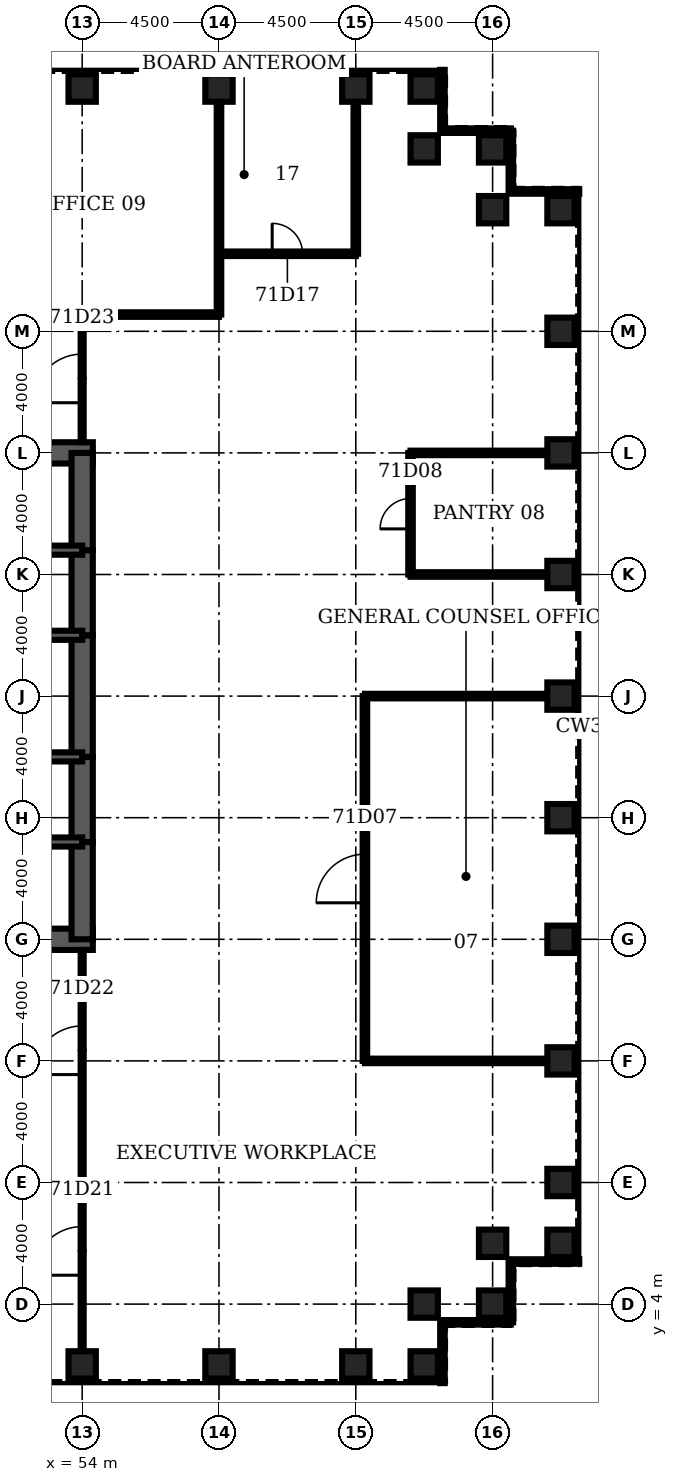
"""IFC4 building model, lengths in metres.
Left out: names, types, materials, properties, quantities, classifications, styles, units other than length and angle.
Written with IfcOpenShell. Run it as: python <this file> out.ifc"""

import sys

from ifc_helpers import new_model, si_unit, direction, frame, frame_2d, origin, origin_2d, place, context, subcontext, project, spatial, rectangle, hollow_rectangle, extrude, element, fill, save


model = new_model("IFC4")
c1 = context("Model", 3, precision=1e-05, world=origin(), true_north=direction((0.0, 1.0)))
c2 = subcontext(c1, "Body", "Model", "MODEL_VIEW")
j1 = project(units=[si_unit("LENGTHUNIT", "METRE"), si_unit("PLANEANGLEUNIT", "RADIAN")], contexts=[c1])
p1 = place(None, origin())
s1 = spatial("IfcSite", under=j1, at=p1, CompositionType="ELEMENT")
p2 = place(p1, origin())
s2 = spatial("IfcBuilding", under=s1, at=p2, CompositionType="ELEMENT")
p3 = place(p2, frame((0.0, 0.0, 313.1)))
s3 = spatial("IfcBuildingStorey", under=s2, at=p3, CompositionType="ELEMENT", Elevation=313.1)
for number, where, z_axis, x_axis in (
    (1, (54.0, 2.0, 0.0), (0.0, 0.0, 1.0), (0.0, 1.0, 0.0)),
    (2, (58.5, 2.0, 0.0), (0.0, 0.0, 1.0), (0.0, 1.0, 0.0)),
    (3, (63.0, 2.0, 0.0), (0.0, 0.0, 1.0), (0.0, 1.0, 0.0)),
    (4, (65.25, 2.0, 0.0), (0.0, 0.0, 1.0), (0.0, 1.0, 0.0)),
    (5, (65.25, 4.0, 0.0), (0.0, 0.0, 1.0), (0.0, 1.0, 0.0)),
    (6, (67.5, 4.0, 0.0), (0.0, 0.0, 1.0), (1.0, 0.0, 0.0)),
    (7, (67.5, 6.0, 0.0), (0.0, 0.0, 1.0), (1.0, 0.0, 0.0)),
    (8, (69.75, 6.0, 0.0), (0.0, 0.0, 1.0), (1.0, 0.0, 0.0)),
    (9, (69.75, 8.0, 0.0), (0.0, 0.0, 1.0), (1.0, 0.0, 0.0)),
    (10, (69.75, 12.0, 0.0), (0.0, 0.0, 1.0), (1.0, 0.0, 0.0)),
    (11, (69.75, 16.0, 0.0), (0.0, 0.0, 1.0), (1.0, 0.0, 0.0)),
    (12, (69.75, 20.0, 0.0), (0.0, 0.0, 1.0), (1.0, 0.0, 0.0)),
    (13, (69.75, 24.0, 0.0), (0.0, 0.0, 1.0), (1.0, 0.0, 0.0)),
    (14, (69.75, 28.0, 0.0), (0.0, 0.0, 1.0), (1.0, 0.0, 0.0)),
    (15, (69.75, 32.0, 0.0), (0.0, 0.0, 1.0), (1.0, 0.0, 0.0)),
    (16, (69.75, 36.0, 0.0), (0.0, 0.0, 1.0), (1.0, 0.0, 0.0)),
    (17, (69.75, 40.0, 0.0), (0.0, 0.0, 1.0), (1.0, 0.0, 0.0)),
    (18, (67.5, 40.0, 0.0), (0.0, 0.0, 1.0), (1.0, 0.0, 0.0)),
    (19, (67.5, 42.0, 0.0), (0.0, 0.0, 1.0), (1.0, 0.0, 0.0)),
    (20, (65.25, 42.0, 0.0), (0.0, 0.0, 1.0), (0.0, 1.0, 0.0)),
    (21, (65.25, 44.0, 0.0), (0.0, 0.0, 1.0), (0.0, 1.0, 0.0)),
    (22, (63.0, 44.0, 0.0), (0.0, 0.0, 1.0), (0.0, 1.0, 0.0)),
    (23, (58.5, 44.0, 0.0), (0.0, 0.0, 1.0), (0.0, 1.0, 0.0)),
    (24, (54.0, 44.0, 0.0), (0.0, 0.0, 1.0), (0.0, 1.0, 0.0)),
):
    element("IfcColumn", number, at=place(p3, frame(where, z_axis=z_axis, x_axis=x_axis)), inside=s3, PredefinedType="COLUMN", context=c2, shape_type="SweptSolid", body=[
        extrude(hollow_rectangle(XDim=0.9, YDim=0.9, WallThickness=0.05, at=origin_2d()), origin(), (0.0, 0.0, 1.0), 4.2),
    ])
for number, where, z_axis, x_axis in (
    (25, (45.0, 16.0, 0.0), (0.0, 0.0, 1.0), (1.0, 0.0, 0.0)),
    (26, (54.35, 32.0, 0.0), (0.0, 0.0, 1.0), (-1.0, 0.0, 0.0)),
):
    element("IfcWall", number, at=place(p3, frame(where, z_axis=z_axis, x_axis=x_axis)), inside=s3, PredefinedType="SHEAR", context=c2, shape_type="SweptSolid", body=[
        extrude(rectangle(XDim=9.35, YDim=0.7, at=frame_2d((4.675, 0.0))), origin(), (0.0, 0.0, 1.0), 4.2),
    ])
p4 = place(p3, frame((54.0, 16.0, 0.0), z_axis=(0.0, 0.0, 1.0), x_axis=(0.0, 1.0, 0.0)))
e27 = element("IfcWall", 27, at=p4, inside=s3, PredefinedType="SHEAR", context=c2, shape_type="SweptSolid", body=[
    extrude(rectangle(XDim=3.2, YDim=0.7, at=frame_2d((1.6, 0.0))), origin(), (0.0, 0.0, 1.0), 4.2),
])
p5 = place(p3, frame((54.0, 19.2, 0.0), z_axis=(0.0, 0.0, 1.0), x_axis=(0.0, 1.0, 0.0)))
e28 = element("IfcWall", 28, at=p5, inside=s3, PredefinedType="SHEAR", context=c2, shape_type="SweptSolid", body=[
    extrude(rectangle(XDim=2.8, YDim=0.7, at=frame_2d((1.4, 0.0))), origin(), (0.0, 0.0, 1.0), 4.2),
])
p6 = place(p5, frame((0.4, 0.0, 0.0)))
e29 = element("IfcOpeningElement", 29, at=p6, cuts=e28, PredefinedType="OPENING", context=c2, shape_type="SweptSolid", body=[
    extrude(rectangle(XDim=1.8, YDim=2.1, at=frame_2d((0.9, 1.05))), frame((0.0, 0.36, 0.0), z_axis=(0.0, -1.0, 0.0), x_axis=(1.0, 0.0, 0.0)), (0.0, 0.0, 1.0), 0.72),
])
p7 = place(p3, frame((54.0, 22.0, 0.0), z_axis=(0.0, 0.0, 1.0), x_axis=(0.0, 1.0, 0.0)))
e30 = element("IfcWall", 30, at=p7, inside=s3, PredefinedType="SHEAR", context=c2, shape_type="SweptSolid", body=[
    extrude(rectangle(XDim=4.0, YDim=0.7, at=frame_2d((2.0, 0.0))), origin(), (0.0, 0.0, 1.0), 4.2),
])
p8 = place(p3, frame((54.0, 26.0, 0.0), z_axis=(0.0, 0.0, 1.0), x_axis=(0.0, 1.0, 0.0)))
e31 = element("IfcWall", 31, at=p8, inside=s3, PredefinedType="SHEAR", context=c2, shape_type="SweptSolid", body=[
    extrude(rectangle(XDim=2.8, YDim=0.7, at=frame_2d((1.4, 0.0))), origin(), (0.0, 0.0, 1.0), 4.2),
])
p9 = place(p8, frame((0.6, 0.0, 0.0)))
e32 = element("IfcOpeningElement", 32, at=p9, cuts=e31, PredefinedType="OPENING", context=c2, shape_type="SweptSolid", body=[
    extrude(rectangle(XDim=1.8, YDim=2.1, at=frame_2d((0.9, 1.05))), frame((0.0, 0.36, 0.0), z_axis=(0.0, -1.0, 0.0), x_axis=(1.0, 0.0, 0.0)), (0.0, 0.0, 1.0), 0.72),
])
p10 = place(p3, frame((54.0, 28.8, 0.0), z_axis=(0.0, 0.0, 1.0), x_axis=(0.0, 1.0, 0.0)))
e33 = element("IfcWall", 33, at=p10, inside=s3, PredefinedType="SHEAR", context=c2, shape_type="SweptSolid", body=[
    extrude(rectangle(XDim=3.2, YDim=0.7, at=frame_2d((1.6, 0.0))), origin(), (0.0, 0.0, 1.0), 4.2),
])
p11 = place(p3, frame((45.0, 19.2, 0.0), z_axis=(0.0, 0.0, 1.0), x_axis=(1.0, 0.0, 0.0)))
e34 = element("IfcWall", 34, at=p11, inside=s3, PredefinedType="SOLIDWALL", context=c2, shape_type="SweptSolid", body=[
    extrude(rectangle(XDim=9.0, YDim=0.3, at=frame_2d((4.5, 0.0))), origin(), (0.0, 0.0, 1.0), 4.2),
])
p12 = place(p11, frame((7.35, 0.0, 0.0)))
e35 = element("IfcOpeningElement", 35, at=p12, cuts=e34, PredefinedType="OPENING", context=c2, shape_type="SweptSolid", body=[
    extrude(rectangle(XDim=1.0, YDim=2.1, at=frame_2d((0.5, 1.05))), frame((0.0, 0.16, 0.0), z_axis=(0.0, -1.0, 0.0), x_axis=(1.0, 0.0, 0.0)), (0.0, 0.0, 1.0), 0.32),
])
p13 = place(p3, frame((45.0, 28.8, 0.0), z_axis=(0.0, 0.0, 1.0), x_axis=(1.0, 0.0, 0.0)))
e36 = element("IfcWall", 36, at=p13, inside=s3, PredefinedType="SOLIDWALL", context=c2, shape_type="SweptSolid", body=[
    extrude(rectangle(XDim=9.0, YDim=0.3, at=frame_2d((4.5, 0.0))), origin(), (0.0, 0.0, 1.0), 4.2),
])
p14 = place(p13, frame((7.35, 0.0, 0.0)))
e37 = element("IfcOpeningElement", 37, at=p14, cuts=e36, PredefinedType="OPENING", context=c2, shape_type="SweptSolid", body=[
    extrude(rectangle(XDim=1.0, YDim=2.1, at=frame_2d((0.5, 1.05))), frame((0.0, 0.16, 0.0), z_axis=(0.0, -1.0, 0.0), x_axis=(1.0, 0.0, 0.0)), (0.0, 0.0, 1.0), 0.32),
])
p15 = place(p3, frame((48.0, 22.0, 0.0), z_axis=(0.0, 0.0, 1.0), x_axis=(1.0, 0.0, 0.0)))
e38 = element("IfcWall", 38, at=p15, inside=s3, PredefinedType="SOLIDWALL", context=c2, shape_type="SweptSolid", body=[
    extrude(rectangle(XDim=6.0, YDim=0.3, at=frame_2d((3.0, 0.0))), origin(), (0.0, 0.0, 1.0), 4.2),
])
p16 = place(p15, frame((2.0, 0.0, 0.0)))
e39 = element("IfcOpeningElement", 39, at=p16, cuts=e38, PredefinedType="OPENING", context=c2, shape_type="SweptSolid", body=[
    extrude(rectangle(XDim=1.0, YDim=2.1, at=frame_2d((0.5, 1.05))), frame((0.0, 0.16, 0.0), z_axis=(0.0, -1.0, 0.0), x_axis=(1.0, 0.0, 0.0)), (0.0, 0.0, 1.0), 0.32),
])
p17 = place(p15, frame((4.25, 0.0, 0.0)))
e40 = element("IfcOpeningElement", 40, at=p17, cuts=e38, PredefinedType="OPENING", context=c2, shape_type="SweptSolid", body=[
    extrude(rectangle(XDim=1.0, YDim=2.1, at=frame_2d((0.5, 1.05))), frame((0.0, 0.16, 0.0), z_axis=(0.0, -1.0, 0.0), x_axis=(1.0, 0.0, 0.0)), (0.0, 0.0, 1.0), 0.32),
])
p18 = place(p3, frame((48.0, 26.0, 0.0), z_axis=(0.0, 0.0, 1.0), x_axis=(1.0, 0.0, 0.0)))
e41 = element("IfcWall", 41, at=p18, inside=s3, PredefinedType="SOLIDWALL", context=c2, shape_type="SweptSolid", body=[
    extrude(rectangle(XDim=6.0, YDim=0.3, at=frame_2d((3.0, 0.0))), origin(), (0.0, 0.0, 1.0), 4.2),
])
for number, where, z_axis, x_axis in (
    (42, (63.3, 12.0, 0.0), (0.0, 0.0, 1.0), (1.0, 0.0, 0.0)),
    (43, (63.3, 24.0, 0.0), (0.0, 0.0, 1.0), (1.0, 0.0, 0.0)),
):
    element("IfcWall", number, at=place(p3, frame(where, z_axis=z_axis, x_axis=x_axis)), inside=s3, PredefinedType="PARTITIONING", context=c2, shape_type="SweptSolid", body=[
        extrude(rectangle(XDim=6.0, YDim=0.15, at=frame_2d((3.0, 0.0))), origin(), (0.0, 0.0, 1.0), 3.0),
    ])
for number, where, z_axis, x_axis in (
    (44, (64.8, 28.0, 0.0), (0.0, 0.0, 1.0), (1.0, 0.0, 0.0)),
    (45, (64.8, 32.0, 0.0), (0.0, 0.0, 1.0), (1.0, 0.0, 0.0)),
):
    element("IfcWall", number, at=place(p3, frame(where, z_axis=z_axis, x_axis=x_axis)), inside=s3, PredefinedType="PARTITIONING", context=c2, shape_type="SweptSolid", body=[
        extrude(rectangle(XDim=4.5, YDim=0.15, at=frame_2d((2.25, 0.0))), origin(), (0.0, 0.0, 1.0), 3.0),
    ])
p19 = place(p3, frame((45.0, 36.55, 0.0), z_axis=(0.0, 0.0, 1.0), x_axis=(1.0, 0.0, 0.0)))
e46 = element("IfcWall", 46, at=p19, inside=s3, PredefinedType="PARTITIONING", context=c2, shape_type="SweptSolid", body=[
    extrude(rectangle(XDim=13.5, YDim=0.15, at=frame_2d((6.75, 0.0))), origin(), (0.0, 0.0, 1.0), 3.0),
])
p20 = place(p19, frame((5.95, 0.0, 0.0)))
e47 = element("IfcOpeningElement", 47, at=p20, cuts=e46, PredefinedType="OPENING", context=c2, shape_type="SweptSolid", body=[
    extrude(rectangle(XDim=1.6, YDim=2.1, at=frame_2d((0.8, 1.05))), frame((0.0, 0.085, 0.0), z_axis=(0.0, -1.0, 0.0), x_axis=(1.0, 0.0, 0.0)), (0.0, 0.0, 1.0), 0.17),
])
p21 = place(p3, frame((58.5, 38.55, 0.0), z_axis=(0.0, 0.0, 1.0), x_axis=(1.0, 0.0, 0.0)))
e48 = element("IfcWall", 48, at=p21, inside=s3, PredefinedType="PARTITIONING", context=c2, shape_type="SweptSolid", body=[
    extrude(rectangle(XDim=4.5, YDim=0.15, at=frame_2d((2.25, 0.0))), origin(), (0.0, 0.0, 1.0), 3.0),
])
p22 = place(p21, frame((1.75, 0.0, 0.0)))
e49 = element("IfcOpeningElement", 49, at=p22, cuts=e48, PredefinedType="OPENING", context=c2, shape_type="SweptSolid", body=[
    extrude(rectangle(XDim=1.0, YDim=2.1, at=frame_2d((0.5, 1.05))), frame((0.0, 0.085, 0.0), z_axis=(0.0, -1.0, 0.0), x_axis=(1.0, 0.0, 0.0)), (0.0, 0.0, 1.0), 0.17),
])
p23 = place(p3, frame((54.0, 2.45, 0.0), z_axis=(0.0, 0.0, 1.0), x_axis=(0.0, 1.0, 0.0)))
e50 = element("IfcWall", 50, at=p23, inside=s3, PredefinedType="PARTITIONING", context=c2, shape_type="SweptSolid", body=[
    extrude(rectangle(XDim=13.2, YDim=0.1, at=frame_2d((6.6, 0.0))), origin(), (0.0, 0.0, 1.0), 3.0),
])
p24 = place(p23, frame((2.5, 0.0, 0.0)))
e51 = element("IfcOpeningElement", 51, at=p24, cuts=e50, PredefinedType="OPENING", context=c2, shape_type="SweptSolid", body=[
    extrude(rectangle(XDim=1.6, YDim=2.1, at=frame_2d((0.8, 1.05))), frame((0.0, 0.06, 0.0), z_axis=(0.0, -1.0, 0.0), x_axis=(1.0, 0.0, 0.0)), (0.0, 0.0, 1.0), 0.12),
])
p25 = place(p23, frame((9.1, 0.0, 0.0)))
e52 = element("IfcOpeningElement", 52, at=p25, cuts=e50, PredefinedType="OPENING", context=c2, shape_type="SweptSolid", body=[
    extrude(rectangle(XDim=1.6, YDim=2.1, at=frame_2d((0.8, 1.05))), frame((0.0, 0.06, 0.0), z_axis=(0.0, -1.0, 0.0), x_axis=(1.0, 0.0, 0.0)), (0.0, 0.0, 1.0), 0.12),
])
p26 = place(p3, frame((54.0, 32.35, 0.0), z_axis=(0.0, 0.0, 1.0), x_axis=(0.0, 1.0, 0.0)))
e53 = element("IfcWall", 53, at=p26, inside=s3, PredefinedType="PARTITIONING", context=c2, shape_type="SweptSolid", body=[
    extrude(rectangle(XDim=4.2, YDim=0.1, at=frame_2d((2.1, 0.0))), origin(), (0.0, 0.0, 1.0), 3.0),
])
p27 = place(p26, frame((1.3, 0.0, 0.0)))
e54 = element("IfcOpeningElement", 54, at=p27, cuts=e53, PredefinedType="OPENING", context=c2, shape_type="SweptSolid", body=[
    extrude(rectangle(XDim=1.6, YDim=2.1, at=frame_2d((0.8, 1.05))), frame((0.0, 0.06, 0.0), z_axis=(0.0, -1.0, 0.0), x_axis=(1.0, 0.0, 0.0)), (0.0, 0.0, 1.0), 0.12),
])
p28 = place(p3, frame((58.5, 36.55, 0.0), z_axis=(0.0, 0.0, 1.0), x_axis=(0.0, 1.0, 0.0)))
e55 = element("IfcWall", 55, at=p28, inside=s3, PredefinedType="PARTITIONING", context=c2, shape_type="SweptSolid", body=[
    extrude(rectangle(XDim=7.0, YDim=0.15, at=frame_2d((3.5, 0.0))), origin(), (0.0, 0.0, 1.0), 3.0),
])
p29 = place(p3, frame((63.0, 38.55, 0.0), z_axis=(0.0, 0.0, 1.0), x_axis=(0.0, 1.0, 0.0)))
e56 = element("IfcWall", 56, at=p29, inside=s3, PredefinedType="PARTITIONING", context=c2, shape_type="SweptSolid", body=[
    extrude(rectangle(XDim=5.0, YDim=0.15, at=frame_2d((2.5, 0.0))), origin(), (0.0, 0.0, 1.0), 3.0),
])
p30 = place(p3, frame((63.3, 12.0, 0.0), z_axis=(0.0, 0.0, 1.0), x_axis=(0.0, 1.0, 0.0)))
e57 = element("IfcWall", 57, at=p30, inside=s3, PredefinedType="PARTITIONING", context=c2, shape_type="SweptSolid", body=[
    extrude(rectangle(XDim=12.0, YDim=0.15, at=frame_2d((6.0, 0.0))), origin(), (0.0, 0.0, 1.0), 3.0),
])
p31 = place(p30, frame((5.2, 0.0, 0.0)))
e58 = element("IfcOpeningElement", 58, at=p31, cuts=e57, PredefinedType="OPENING", context=c2, shape_type="SweptSolid", body=[
    extrude(rectangle(XDim=1.6, YDim=2.1, at=frame_2d((0.8, 1.05))), frame((0.0, 0.085, 0.0), z_axis=(0.0, -1.0, 0.0), x_axis=(1.0, 0.0, 0.0)), (0.0, 0.0, 1.0), 0.17),
])
p32 = place(p3, frame((64.8, 28.0, 0.0), z_axis=(0.0, 0.0, 1.0), x_axis=(0.0, 1.0, 0.0)))
e59 = element("IfcWall", 59, at=p32, inside=s3, PredefinedType="PARTITIONING", context=c2, shape_type="SweptSolid", body=[
    extrude(rectangle(XDim=4.0, YDim=0.15, at=frame_2d((2.0, 0.0))), origin(), (0.0, 0.0, 1.0), 3.0),
])
p33 = place(p32, frame((1.5, 0.0, 0.0)))
e60 = element("IfcOpeningElement", 60, at=p33, cuts=e59, PredefinedType="OPENING", context=c2, shape_type="SweptSolid", body=[
    extrude(rectangle(XDim=1.0, YDim=2.1, at=frame_2d((0.5, 1.05))), frame((0.0, 0.085, 0.0), z_axis=(0.0, -1.0, 0.0), x_axis=(1.0, 0.0, 0.0)), (0.0, 0.0, 1.0), 0.17),
])
p34 = place(p3, frame((65.85, 1.4, 0.0), z_axis=(0.0, 0.0, 1.0), x_axis=(0.0, 1.0, 0.0)))
e61 = element("IfcWall", 61, at=p34, inside=s3, PredefinedType="ELEMENTEDWALL", context=c2, shape_type="SweptSolid", body=[
    extrude(rectangle(XDim=2.0, YDim=0.15, at=frame_2d((1.0, 0.0))), origin(), (0.0, 0.0, 1.0), 4.04),
])
p35 = place(p3, frame((65.85, 3.4, 0.0), z_axis=(0.0, 0.0, 1.0), x_axis=(1.0, 0.0, 0.0)))
e62 = element("IfcWall", 62, at=p35, inside=s3, PredefinedType="ELEMENTEDWALL", context=c2, shape_type="SweptSolid", body=[
    extrude(rectangle(XDim=2.25, YDim=0.15, at=frame_2d((1.125, 0.0))), origin(), (0.0, 0.0, 1.0), 4.04),
])
p36 = place(p3, frame((68.1, 3.4, 0.0), z_axis=(0.0, 0.0, 1.0), x_axis=(0.0, 1.0, 0.0)))
e63 = element("IfcWall", 63, at=p36, inside=s3, PredefinedType="ELEMENTEDWALL", context=c2, shape_type="SweptSolid", body=[
    extrude(rectangle(XDim=2.0, YDim=0.15, at=frame_2d((1.0, 0.0))), origin(), (0.0, 0.0, 1.0), 4.04),
])
for number, where, z_axis, x_axis in (
    (64, (68.1, 5.4, 0.0), (0.0, 0.0, 1.0), (1.0, 0.0, 0.0)),
    (65, (70.35, 40.6, 0.0), (0.0, 0.0, 1.0), (-1.0, 0.0, 0.0)),
):
    element("IfcWall", number, at=place(p3, frame(where, z_axis=z_axis, x_axis=x_axis)), inside=s3, PredefinedType="ELEMENTEDWALL", context=c2, shape_type="SweptSolid", body=[
        extrude(rectangle(XDim=2.25, YDim=0.15, at=frame_2d((1.125, 0.0))), origin(), (0.0, 0.0, 1.0), 4.04),
    ])
p37 = place(p3, frame((68.1, 40.6, 0.0), z_axis=(0.0, 0.0, 1.0), x_axis=(0.0, 1.0, 0.0)))
e66 = element("IfcWall", 66, at=p37, inside=s3, PredefinedType="ELEMENTEDWALL", context=c2, shape_type="SweptSolid", body=[
    extrude(rectangle(XDim=2.0, YDim=0.15, at=frame_2d((1.0, 0.0))), origin(), (0.0, 0.0, 1.0), 4.04),
])
p38 = place(p3, frame((68.1, 42.6, 0.0), z_axis=(0.0, 0.0, 1.0), x_axis=(-1.0, 0.0, 0.0)))
e67 = element("IfcWall", 67, at=p38, inside=s3, PredefinedType="ELEMENTEDWALL", context=c2, shape_type="SweptSolid", body=[
    extrude(rectangle(XDim=2.25, YDim=0.15, at=frame_2d((1.125, 0.0))), origin(), (0.0, 0.0, 1.0), 4.04),
])
p39 = place(p3, frame((65.85, 42.6, 0.0), z_axis=(0.0, 0.0, 1.0), x_axis=(0.0, 1.0, 0.0)))
e68 = element("IfcWall", 68, at=p39, inside=s3, PredefinedType="ELEMENTEDWALL", context=c2, shape_type="SweptSolid", body=[
    extrude(rectangle(XDim=2.0, YDim=0.15, at=frame_2d((1.0, 0.0))), origin(), (0.0, 0.0, 1.0), 4.04),
])
p40 = place(p31, origin())
e69 = element("IfcDoor", 69, at=p40, inside=s3, OperationType="SINGLE_SWING_LEFT", PredefinedType="DOOR", context=c2, shape_type="SweptSolid", body=[
    extrude(rectangle(XDim=1.6, YDim=2.1, at=frame_2d((0.8, 1.05))), frame((0.0, 0.025, 0.0), z_axis=(0.0, -1.0, 0.0), x_axis=(1.0, 0.0, 0.0)), (0.0, 0.0, 1.0), 0.05),
])
fill(e58, e69)
p41 = place(p33, origin())
e70 = element("IfcDoor", 70, at=p41, inside=s3, OperationType="SINGLE_SWING_LEFT", PredefinedType="DOOR", context=c2, shape_type="SweptSolid", body=[
    extrude(rectangle(XDim=1.0, YDim=2.1, at=frame_2d((0.5, 1.05))), frame((0.0, 0.025, 0.0), z_axis=(0.0, -1.0, 0.0), x_axis=(1.0, 0.0, 0.0)), (0.0, 0.0, 1.0), 0.05),
])
fill(e60, e70)
p42 = place(p22, origin())
e71 = element("IfcDoor", 71, at=p42, inside=s3, OperationType="SINGLE_SWING_LEFT", PredefinedType="DOOR", context=c2, shape_type="SweptSolid", body=[
    extrude(rectangle(XDim=1.0, YDim=2.1, at=frame_2d((0.5, 1.05))), frame((0.0, 0.025, 0.0), z_axis=(0.0, -1.0, 0.0), x_axis=(1.0, 0.0, 0.0)), (0.0, 0.0, 1.0), 0.05),
])
fill(e49, e71)
p43 = place(p24, origin())
e72 = element("IfcDoor", 72, at=p43, inside=s3, OperationType="SINGLE_SWING_LEFT", PredefinedType="DOOR", context=c2, shape_type="SweptSolid", body=[
    extrude(rectangle(XDim=1.6, YDim=2.1, at=frame_2d((0.8, 1.05))), frame((0.0, 0.025, 0.0), z_axis=(0.0, -1.0, 0.0), x_axis=(1.0, 0.0, 0.0)), (0.0, 0.0, 1.0), 0.05),
])
fill(e51, e72)
p44 = place(p25, origin())
e73 = element("IfcDoor", 73, at=p44, inside=s3, OperationType="SINGLE_SWING_LEFT", PredefinedType="DOOR", context=c2, shape_type="SweptSolid", body=[
    extrude(rectangle(XDim=1.6, YDim=2.1, at=frame_2d((0.8, 1.05))), frame((0.0, 0.025, 0.0), z_axis=(0.0, -1.0, 0.0), x_axis=(1.0, 0.0, 0.0)), (0.0, 0.0, 1.0), 0.05),
])
fill(e52, e73)
p45 = place(p27, origin())
e74 = element("IfcDoor", 74, at=p45, inside=s3, OperationType="SINGLE_SWING_LEFT", PredefinedType="DOOR", context=c2, shape_type="SweptSolid", body=[
    extrude(rectangle(XDim=1.6, YDim=2.1, at=frame_2d((0.8, 1.05))), frame((0.0, 0.025, 0.0), z_axis=(0.0, -1.0, 0.0), x_axis=(1.0, 0.0, 0.0)), (0.0, 0.0, 1.0), 0.05),
])
fill(e54, e74)
p46 = place(p12, origin())
e75 = element("IfcDoor", 75, at=p46, inside=s3, OperationType="SINGLE_SWING_RIGHT", PredefinedType="DOOR", context=c2, shape_type="SweptSolid", body=[
    extrude(rectangle(XDim=1.0, YDim=2.1, at=frame_2d((0.5, 1.05))), frame((0.0, 0.025, 0.0), z_axis=(0.0, -1.0, 0.0), x_axis=(1.0, 0.0, 0.0)), (0.0, 0.0, 1.0), 0.05),
])
fill(e35, e75)
p47 = place(p14, origin())
e76 = element("IfcDoor", 76, at=p47, inside=s3, OperationType="SINGLE_SWING_RIGHT", PredefinedType="DOOR", context=c2, shape_type="SweptSolid", body=[
    extrude(rectangle(XDim=1.0, YDim=2.1, at=frame_2d((0.5, 1.05))), frame((0.0, 0.025, 0.0), z_axis=(0.0, -1.0, 0.0), x_axis=(1.0, 0.0, 0.0)), (0.0, 0.0, 1.0), 0.05),
])
fill(e37, e76)
p48 = place(p6, origin())
e77 = element("IfcDoor", 77, at=p48, inside=s3, OperationType="SINGLE_SWING_LEFT", PredefinedType="DOOR", context=c2, shape_type="SweptSolid", body=[
    extrude(rectangle(XDim=1.8, YDim=2.1, at=frame_2d((0.9, 1.05))), frame((0.0, 0.35, 0.0), z_axis=(0.0, -1.0, 0.0), x_axis=(1.0, 0.0, 0.0)), (0.0, 0.0, 1.0), 0.699),
])
fill(e29, e77)
p49 = place(p9, origin())
e78 = element("IfcDoor", 78, at=p49, inside=s3, OperationType="SINGLE_SWING_LEFT", PredefinedType="DOOR", context=c2, shape_type="SweptSolid", body=[
    extrude(rectangle(XDim=1.8, YDim=2.1, at=frame_2d((0.9, 1.05))), frame((0.0, 0.35, 0.0), z_axis=(0.0, -1.0, 0.0), x_axis=(1.0, 0.0, 0.0)), (0.0, 0.0, 1.0), 0.699),
])
fill(e32, e78)
p50 = place(p17, origin())
e79 = element("IfcDoor", 79, at=p50, inside=s3, OperationType="SINGLE_SWING_RIGHT", PredefinedType="DOOR", context=c2, shape_type="SweptSolid", body=[
    extrude(rectangle(XDim=1.0, YDim=2.1, at=frame_2d((0.5, 1.05))), frame((0.0, 0.025, 0.0), z_axis=(0.0, -1.0, 0.0), x_axis=(1.0, 0.0, 0.0)), (0.0, 0.0, 1.0), 0.05),
])
fill(e40, e79)
save(model, sys.argv[1])
